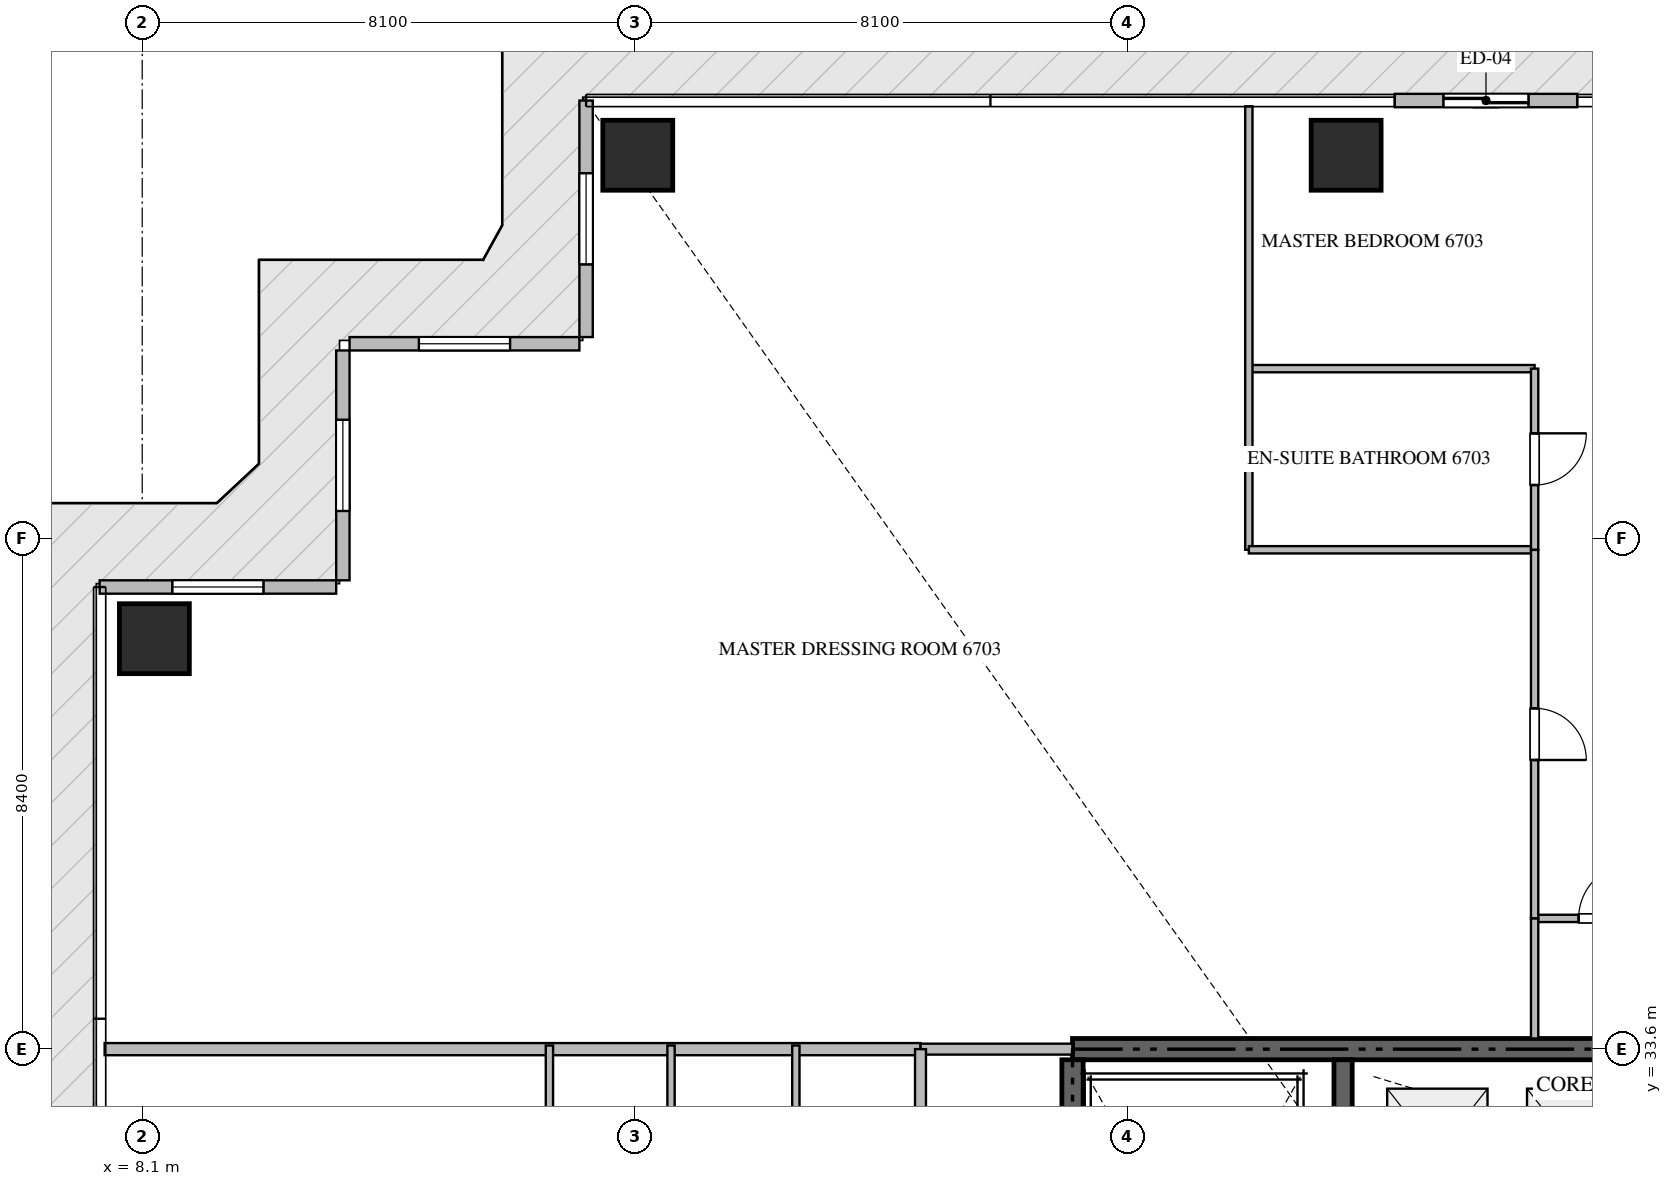
"""IFC4 building model, lengths in metres.
Left out: names, types, materials, properties, quantities, classifications, styles, units other than length and angle.
Written with IfcOpenShell. Run it as: python <this file> out.ifc"""

import sys

from ifc_helpers import new_model, si_unit, direction, frame, frame_2d, origin, origin_2d, place, context, subcontext, project, spatial, rectangle, extrude, source, transform, mapped, element, fill, save


model = new_model("IFC4")
c1 = context("Model", 3, precision=1e-05, world=origin(), true_north=direction((0.0, 1.0)))
c2 = subcontext(c1, "Body", "Model", "MODEL_VIEW")
j1 = project(units=[si_unit("LENGTHUNIT", "METRE"), si_unit("PLANEANGLEUNIT", "RADIAN")], contexts=[c1])
p1 = place(None, origin())
s1 = spatial("IfcSite", under=j1, at=p1, CompositionType="ELEMENT")
p2 = place(p1, origin())
s2 = spatial("IfcBuilding", under=s1, at=p2, CompositionType="ELEMENT")
p3 = place(p2, frame((0.0, 0.0, 268.2)))
s3 = spatial("IfcBuildingStorey", under=s2, at=p3, CompositionType="ELEMENT", Elevation=268.2)
p4 = place(p3, frame((41.4, 33.6, -0.26), z_axis=(0.0, 0.0, 1.0), x_axis=(-1.0, 0.0, 0.0)))
e1 = element("IfcWall", 1, at=p4, inside=s3, PredefinedType="SHEAR", context=c2, shape_type="SweptSolid", body=[
    extrude(rectangle(XDim=18.0, YDim=0.35, at=frame_2d((9.0, 0.0))), origin(), (0.0, 0.0, 1.0), 3.848),
])
p5 = place(p3, frame((23.4, 24.25, -0.26), z_axis=(0.0, 0.0, 1.0), x_axis=(0.0, 1.0, 0.0)))
e2 = element("IfcWall", 2, at=p5, inside=s3, PredefinedType="SHEAR", context=c2, shape_type="SweptSolid", body=[
    extrude(rectangle(XDim=9.175, YDim=0.35, at=frame_2d((4.587, 0.0))), origin(), (0.0, 0.0, 1.0), 3.848),
])
p6 = place(p3, frame((27.85, 23.55, -0.26), z_axis=(0.0, 0.0, 1.0), x_axis=(0.0, 1.0, 0.0)))
e3 = element("IfcWall", 3, at=p6, inside=s3, PredefinedType="SHEAR", context=c2, shape_type="SweptSolid", body=[
    extrude(rectangle(XDim=9.875, YDim=0.3, at=frame_2d((4.938, 0.0))), origin(), (0.0, 0.0, 1.0), 3.848),
])
m1 = source(origin(), c2, "Body", "SweptSolid", [
    extrude(rectangle(XDim=1.15, YDim=1.15, at=origin_2d()), origin(), (0.0, 0.0, 1.0), 3.85),
])
for number, where, z_axis, x_axis in (
    (4, (16.25, 48.3, -0.26), (0.0, 0.0, 1.0), (1.0, 0.0, 0.0)),
    (5, (27.9, 48.3, -0.26), (0.0, 0.0, 1.0), (1.0, 0.0, 0.0)),
    (6, (8.3, 40.35, -0.26), (0.0, 0.0, 1.0), (1.0, 0.0, 0.0)),
):
    element("IfcColumn", number, at=place(p3, frame(where, z_axis=z_axis, x_axis=x_axis)), inside=s3, PredefinedType="COLUMN", context=c2, shape_type="MappedRepresentation", body=[
        mapped(m1, transform((0.0, 0.0, 0.0), scale=1.0)),
    ])
p7 = place(p3, frame((31.7, 49.2, 0.0), z_axis=(0.0, 0.0, 1.0), x_axis=(-1.0, 0.0, 0.0)))
e7 = element("IfcWall", 7, at=p7, inside=s3, PredefinedType="ELEMENTEDWALL", context=c2, shape_type="SweptSolid", body=[
    extrude(rectangle(XDim=3.0, YDim=0.22, at=frame_2d((1.5, 0.0))), origin(), (0.0, 0.0, 1.0), 3.575),
])
p8 = place(p7, frame((0.8, 0.0, 0.0)))
e8 = element("IfcOpeningElement", 8, at=p8, cuts=e7, PredefinedType="OPENING", context=c2, shape_type="SweptSolid", body=[
    extrude(rectangle(XDim=1.4, YDim=2.25, at=frame_2d((0.7, 1.125))), frame((0.0, 0.12, 0.0), z_axis=(0.0, -1.0, 0.0), x_axis=(1.0, 0.0, 0.0)), (0.0, 0.0, 1.0), 0.24),
])
p9 = place(p3, frame((15.4, 49.2, 0.0), z_axis=(0.0, 0.0, 1.0), x_axis=(0.0, -1.0, 0.0)))
e9 = element("IfcWall", 9, at=p9, inside=s3, PredefinedType="ELEMENTEDWALL", context=c2, shape_type="SweptSolid", body=[
    extrude(rectangle(XDim=3.89, YDim=0.22, at=frame_2d((1.945, 0.0))), origin(), (0.0, 0.0, 1.0), 3.575),
])
p10 = place(p9, frame((1.195, 0.0, 0.65)))
e10 = element("IfcOpeningElement", 10, at=p10, cuts=e9, PredefinedType="OPENING", context=c2, shape_type="SweptSolid", body=[
    extrude(rectangle(XDim=1.5, YDim=2.25, at=frame_2d((0.75, 1.125))), frame((0.0, 0.12, 0.0), z_axis=(0.0, -1.0, 0.0), x_axis=(1.0, 0.0, 0.0)), (0.0, 0.0, 1.0), 0.24),
])
p11 = place(p3, frame((15.29, 45.2, 0.0), z_axis=(0.0, 0.0, 1.0), x_axis=(-1.0, 0.0, 0.0)))
e11 = element("IfcWall", 11, at=p11, inside=s3, PredefinedType="ELEMENTEDWALL", context=c2, shape_type="SweptSolid", body=[
    extrude(rectangle(XDim=3.78, YDim=0.22, at=frame_2d((1.89, 0.0))), origin(), (0.0, 0.0, 1.0), 3.575),
])
p12 = place(p11, frame((1.14, 0.0, 0.65)))
e12 = element("IfcOpeningElement", 12, at=p12, cuts=e11, PredefinedType="OPENING", context=c2, shape_type="SweptSolid", body=[
    extrude(rectangle(XDim=1.5, YDim=2.25, at=frame_2d((0.75, 1.125))), frame((0.0, 0.12, 0.0), z_axis=(0.0, -1.0, 0.0), x_axis=(1.0, 0.0, 0.0)), (0.0, 0.0, 1.0), 0.24),
])
p13 = place(p3, frame((11.4, 45.09, 0.0), z_axis=(0.0, 0.0, 1.0), x_axis=(0.0, -1.0, 0.0)))
e13 = element("IfcWall", 13, at=p13, inside=s3, PredefinedType="ELEMENTEDWALL", context=c2, shape_type="SweptSolid", body=[
    extrude(rectangle(XDim=3.78, YDim=0.22, at=frame_2d((1.89, 0.0))), origin(), (0.0, 0.0, 1.0), 3.575),
])
p14 = place(p13, frame((1.14, 0.0, 0.65)))
e14 = element("IfcOpeningElement", 14, at=p14, cuts=e13, PredefinedType="OPENING", context=c2, shape_type="SweptSolid", body=[
    extrude(rectangle(XDim=1.5, YDim=2.25, at=frame_2d((0.75, 1.125))), frame((0.0, 0.12, 0.0), z_axis=(0.0, -1.0, 0.0), x_axis=(1.0, 0.0, 0.0)), (0.0, 0.0, 1.0), 0.24),
])
p15 = place(p3, frame((11.29, 41.2, 0.0), z_axis=(0.0, 0.0, 1.0), x_axis=(-1.0, 0.0, 0.0)))
e15 = element("IfcWall", 15, at=p15, inside=s3, PredefinedType="ELEMENTEDWALL", context=c2, shape_type="SweptSolid", body=[
    extrude(rectangle(XDim=3.89, YDim=0.22, at=frame_2d((1.945, 0.0))), origin(), (0.0, 0.0, 1.0), 3.575),
])
p16 = place(p15, frame((1.195, 0.0, 0.65)))
e16 = element("IfcOpeningElement", 16, at=p16, cuts=e15, PredefinedType="OPENING", context=c2, shape_type="SweptSolid", body=[
    extrude(rectangle(XDim=1.5, YDim=2.25, at=frame_2d((0.75, 1.125))), frame((0.0, 0.12, 0.0), z_axis=(0.0, -1.0, 0.0), x_axis=(1.0, 0.0, 0.0)), (0.0, 0.0, 1.0), 0.24),
])
p17 = place(p3, frame((7.482, 33.6, 0.0), z_axis=(0.0, 0.0, 1.0), x_axis=(1.0, 0.0, 0.0)))
e17 = element("IfcWall", 17, at=p17, inside=s3, PredefinedType="PARTITIONING", context=c2, shape_type="SweptSolid", body=[
    extrude(rectangle(XDim=13.418, YDim=0.2, at=frame_2d((6.709, 0.0))), origin(), (0.0, 0.0, 1.0), 3.59),
])
p18 = place(p3, frame((20.902, 33.6, 0.0), z_axis=(0.0, 0.0, 1.0), x_axis=(1.0, 0.0, 0.0)))
e18 = element("IfcWall", 18, at=p18, inside=s3, PredefinedType="PARTITIONING", context=c2, shape_type="SweptSolid", body=[
    extrude(rectangle(XDim=2.496, YDim=0.18, at=frame_2d((1.248, 0.0))), origin(), (0.0, 0.0, 1.0), 3.59),
])
p19 = place(p3, frame((20.9, 16.8, 0.0), z_axis=(0.0, 0.0, 1.0), x_axis=(0.0, 1.0, 0.0)))
e19 = element("IfcWall", 19, at=p19, inside=s3, PredefinedType="PARTITIONING", context=c2, shape_type="SweptSolid", body=[
    extrude(rectangle(XDim=16.8, YDim=0.18, at=frame_2d((8.4, 0.0))), origin(), (0.0, 0.0, 1.0), 3.59),
])
p20 = place(p19, frame((4.503, 0.0, 0.0)))
e20 = element("IfcOpeningElement", 20, at=p20, cuts=e19, PredefinedType="OPENING", context=c2, shape_type="SweptSolid", body=[
    extrude(rectangle(XDim=1.0, YDim=2.15, at=frame_2d((0.5, 1.075))), frame((0.0, 0.1, 0.0), z_axis=(0.0, -1.0, 0.0), x_axis=(1.0, 0.0, 0.0)), (0.0, 0.0, 1.0), 0.2),
])
p21 = place(p19, frame((8.706, 0.0, 0.0)))
e21 = element("IfcOpeningElement", 21, at=p21, cuts=e19, PredefinedType="OPENING", context=c2, shape_type="SweptSolid", body=[
    extrude(rectangle(XDim=1.0, YDim=2.15, at=frame_2d((0.5, 1.075))), frame((0.0, 0.1, 0.0), z_axis=(0.0, -1.0, 0.0), x_axis=(1.0, 0.0, 0.0)), (0.0, 0.0, 1.0), 0.2),
])
p22 = place(p3, frame((31.0, 35.75, 0.0), z_axis=(0.0, 0.0, 1.0), x_axis=(1.0, 0.0, 0.0)))
e22 = element("IfcWall", 22, at=p22, inside=s3, PredefinedType="PARTITIONING", context=c2, shape_type="SweptSolid", body=[
    extrude(rectangle(XDim=2.348, YDim=0.12, at=frame_2d((1.174, 0.0))), origin(), (0.0, 0.0, 1.0), 3.59),
])
p23 = place(p22, frame((0.724, 0.0, 0.0)))
e23 = element("IfcOpeningElement", 23, at=p23, cuts=e22, PredefinedType="OPENING", context=c2, shape_type="SweptSolid", body=[
    extrude(rectangle(XDim=0.9, YDim=2.1, at=frame_2d((0.45, 1.05))), frame((0.0, 0.07, 0.0), z_axis=(0.0, -1.0, 0.0), x_axis=(1.0, 0.0, 0.0)), (0.0, 0.0, 1.0), 0.14),
])
p24 = place(p3, frame((26.3, 44.791, 0.0), z_axis=(0.0, 0.0, 1.0), x_axis=(1.0, 0.0, 0.0)))
e24 = element("IfcWall", 24, at=p24, inside=s3, PredefinedType="PARTITIONING", context=c2, shape_type="SweptSolid", body=[
    extrude(rectangle(XDim=4.7, YDim=0.12, at=frame_2d((2.35, 0.0))), origin(), (0.0, 0.0, 1.0), 3.59),
])
p25 = place(p3, frame((26.3, 49.105, 0.0), z_axis=(0.0, 0.0, 1.0), x_axis=(0.0, -1.0, 0.0)))
e25 = element("IfcWall", 25, at=p25, inside=s3, PredefinedType="PARTITIONING", context=c2, shape_type="SweptSolid", body=[
    extrude(rectangle(XDim=7.293, YDim=0.12, at=frame_2d((3.646, 0.0))), origin(), (0.0, 0.0, 1.0), 3.59),
])
p26 = place(p3, frame((26.3, 41.812, 0.0), z_axis=(0.0, 0.0, 1.0), x_axis=(1.0, 0.0, 0.0)))
e26 = element("IfcWall", 26, at=p26, inside=s3, PredefinedType="PARTITIONING", context=c2, shape_type="SweptSolid", body=[
    extrude(rectangle(XDim=4.7, YDim=0.12, at=frame_2d((2.35, 0.0))), origin(), (0.0, 0.0, 1.0), 3.59),
])
p27 = place(p3, frame((31.0, 44.791, 0.0), z_axis=(0.0, 0.0, 1.0), x_axis=(0.0, -1.0, 0.0)))
e27 = element("IfcWall", 27, at=p27, inside=s3, PredefinedType="PARTITIONING", context=c2, shape_type="SweptSolid", body=[
    extrude(rectangle(XDim=2.979, YDim=0.12, at=frame_2d((1.49, 0.0))), origin(), (0.0, 0.0, 1.0), 3.59),
])
p28 = place(p27, frame((1.064, 0.0, 0.0)))
e28 = element("IfcOpeningElement", 28, at=p28, cuts=e27, PredefinedType="OPENING", context=c2, shape_type="SweptSolid", body=[
    extrude(rectangle(XDim=0.85, YDim=2.1, at=frame_2d((0.425, 1.05))), frame((0.0, 0.07, 0.0), z_axis=(0.0, -1.0, 0.0), x_axis=(1.0, 0.0, 0.0)), (0.0, 0.0, 1.0), 0.14),
])
p29 = place(p3, frame((31.0, 41.81, 0.0), z_axis=(0.0, 0.0, 1.0), x_axis=(0.0, -1.0, 0.0)))
e29 = element("IfcWall", 29, at=p29, inside=s3, PredefinedType="PARTITIONING", context=c2, shape_type="SweptSolid", body=[
    extrude(rectangle(XDim=6.06, YDim=0.12, at=frame_2d((3.03, 0.0))), origin(), (0.0, 0.0, 1.0), 3.59),
])
p30 = place(p29, frame((2.605, 0.0, 0.0)))
e30 = element("IfcOpeningElement", 30, at=p30, cuts=e29, PredefinedType="OPENING", context=c2, shape_type="SweptSolid", body=[
    extrude(rectangle(XDim=0.85, YDim=2.1, at=frame_2d((0.425, 1.05))), frame((0.0, 0.07, 0.0), z_axis=(0.0, -1.0, 0.0), x_axis=(1.0, 0.0, 0.0)), (0.0, 0.0, 1.0), 0.14),
])
p31 = place(p3, frame((31.0, 35.748, 0.0), z_axis=(0.0, 0.0, 1.0), x_axis=(0.0, -1.0, 0.0)))
e31 = element("IfcWall", 31, at=p31, inside=s3, PredefinedType="PARTITIONING", context=c2, shape_type="SweptSolid", body=[
    extrude(rectangle(XDim=1.973, YDim=0.12, at=frame_2d((0.987, 0.0))), origin(), (0.0, 0.0, 1.0), 3.59),
])
for number, where, z_axis, x_axis in (
    (32, (14.797, 27.8, 0.0), (0.0, 0.0, 1.0), (0.0, 1.0, 0.0)),
    (33, (16.797, 27.8, 0.0), (0.0, 0.0, 1.0), (0.0, 1.0, 0.0)),
    (34, (18.85, 27.8, 0.0), (0.0, 0.0, 1.0), (0.0, 1.0, 0.0)),
):
    element("IfcWall", number, at=place(p3, frame(where, z_axis=z_axis, x_axis=x_axis)), inside=s3, PredefinedType="PARTITIONING", context=c2, shape_type="SweptSolid", body=[
        extrude(rectangle(XDim=5.86, YDim=0.12, at=frame_2d((2.93, 0.0))), origin(), (0.0, 0.0, 1.0), 3.59),
    ])
m2 = source(origin(), c2, "Body", "SweptSolid", [
    extrude(rectangle(XDim=1.4, YDim=2.25, at=frame_2d((0.7, 1.125))), frame((0.0, 0.025, 0.0), z_axis=(0.0, -1.0, 0.0), x_axis=(1.0, 0.0, 0.0)), (0.0, 0.0, 1.0), 0.05),
])
p32 = place(p8, origin())
e35 = element("IfcDoor", 35, at=p32, inside=s3, OperationType="SLIDING_TO_LEFT", PredefinedType="DOOR", context=c2, shape_type="MappedRepresentation", body=[
    mapped(m2, transform((0.0, 0.0, 0.0), scale=1.0)),
])
fill(e8, e35)
m3 = source(origin(), c2, "Body", "SweptSolid", [
    extrude(rectangle(XDim=1.5, YDim=2.25, at=frame_2d((0.75, 1.125))), frame((0.0, 0.03, 0.0), z_axis=(0.0, -1.0, 0.0), x_axis=(1.0, 0.0, 0.0)), (0.0, 0.0, 1.0), 0.06),
])
p33 = place(p10, origin())
e36 = element("IfcWindow", 36, at=p33, inside=s3, PartitioningType="SINGLE_PANEL", PredefinedType="WINDOW", context=c2, shape_type="MappedRepresentation", body=[
    mapped(m3, transform((0.0, 0.0, 0.0), scale=1.0)),
])
fill(e10, e36)
p34 = place(p12, origin())
e37 = element("IfcWindow", 37, at=p34, inside=s3, PartitioningType="SINGLE_PANEL", PredefinedType="WINDOW", context=c2, shape_type="MappedRepresentation", body=[
    mapped(m3, transform((0.0, 0.0, 0.0), scale=1.0)),
])
fill(e12, e37)
p35 = place(p14, origin())
e38 = element("IfcWindow", 38, at=p35, inside=s3, PartitioningType="SINGLE_PANEL", PredefinedType="WINDOW", context=c2, shape_type="MappedRepresentation", body=[
    mapped(m3, transform((0.0, 0.0, 0.0), scale=1.0)),
])
fill(e14, e38)
p36 = place(p16, origin())
e39 = element("IfcWindow", 39, at=p36, inside=s3, PartitioningType="SINGLE_PANEL", PredefinedType="WINDOW", context=c2, shape_type="MappedRepresentation", body=[
    mapped(m3, transform((0.0, 0.0, 0.0), scale=1.0)),
])
fill(e16, e39)
m4 = source(origin(), c2, "Body", "SweptSolid", [
    extrude(rectangle(XDim=0.9, YDim=2.1, at=frame_2d((0.45, 1.05))), frame((0.0, 0.025, 0.0), z_axis=(0.0, -1.0, 0.0), x_axis=(1.0, 0.0, 0.0)), (0.0, 0.0, 1.0), 0.05),
])
p37 = place(p23, origin())
e40 = element("IfcDoor", 40, at=p37, inside=s3, OperationType="SINGLE_SWING_RIGHT", PredefinedType="DOOR", context=c2, shape_type="MappedRepresentation", body=[
    mapped(m4, transform((0.0, 0.0, 0.0), scale=1.0)),
])
fill(e23, e40)
m5 = source(origin(), c2, "Body", "SweptSolid", [
    extrude(rectangle(XDim=0.85, YDim=2.1, at=frame_2d((0.425, 1.05))), frame((0.0, 0.025, 0.0), z_axis=(0.0, -1.0, 0.0), x_axis=(1.0, 0.0, 0.0)), (0.0, 0.0, 1.0), 0.05),
])
p38 = place(p28, origin())
e41 = element("IfcDoor", 41, at=p38, inside=s3, OperationType="SINGLE_SWING_LEFT", PredefinedType="DOOR", context=c2, shape_type="MappedRepresentation", body=[
    mapped(m5, transform((0.0, 0.0, 0.0), scale=1.0)),
])
fill(e28, e41)
p39 = place(p30, origin())
e42 = element("IfcDoor", 42, at=p39, inside=s3, OperationType="SINGLE_SWING_RIGHT", PredefinedType="DOOR", context=c2, shape_type="MappedRepresentation", body=[
    mapped(m5, transform((0.0, 0.0, 0.0), scale=1.0)),
])
fill(e30, e42)
save(model, sys.argv[1])
